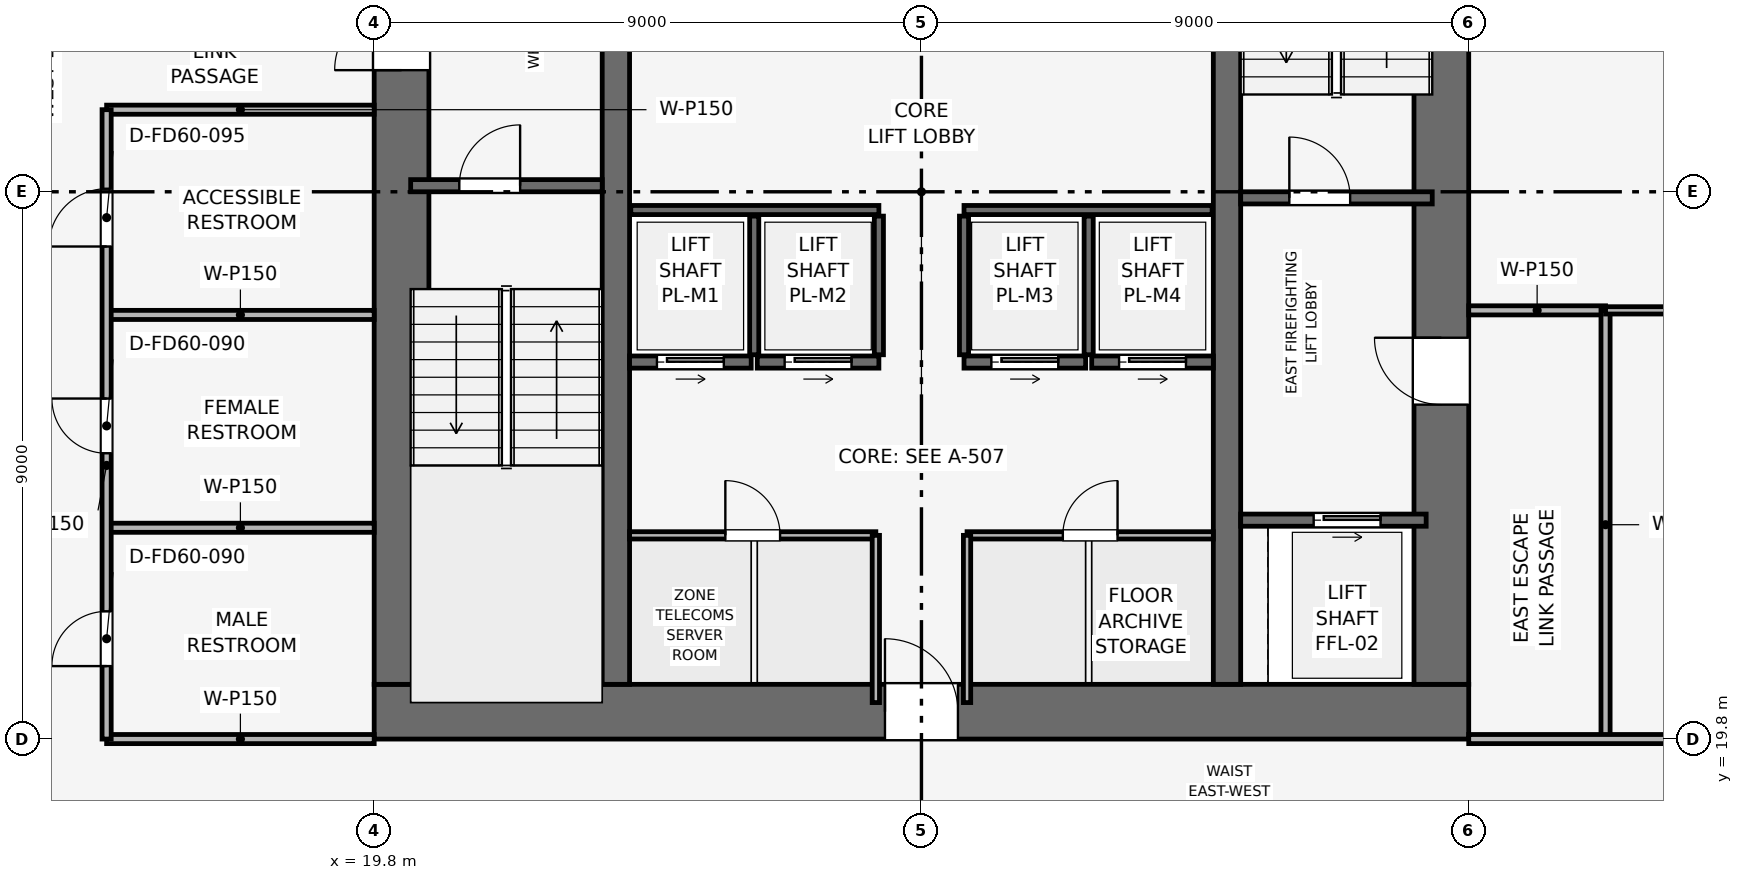
"""IFC4 building model, lengths in metres.
Left out: names, types, materials, properties, quantities, classifications, styles, units other than length and angle.
Written with IfcOpenShell. Run it as: python <this file> out.ifc"""

import sys

from ifc_helpers import new_model, si_unit, direction, frame, frame_2d, origin, place, context, subcontext, project, spatial, rectangle, extrude, element, fill, save


model = new_model("IFC4")
c1 = context("Model", 3, precision=1e-05, world=origin(), true_north=direction((0.0, 1.0)))
c2 = subcontext(c1, "Body", "Model", "MODEL_VIEW")
j1 = project(units=[si_unit("LENGTHUNIT", "METRE"), si_unit("PLANEANGLEUNIT", "RADIAN")], contexts=[c1])
p1 = place(None, origin())
s1 = spatial("IfcSite", under=j1, at=p1, CompositionType="ELEMENT")
p2 = place(p1, origin())
s2 = spatial("IfcBuilding", under=s1, at=p2, CompositionType="ELEMENT")
p3 = place(p2, frame((0.0, 0.0, 149.55)))
s3 = spatial("IfcBuildingStorey", under=s2, at=p3, CompositionType="ELEMENT", Elevation=149.55)
p4 = place(p3, frame((19.8, 20.25, 0.0), z_axis=(0.0, 0.0, 1.0), x_axis=(1.0, 0.0, 0.0)))
e1 = element("IfcWall", 1, at=p4, inside=s3, PredefinedType="SHEAR", context=c2, shape_type="SweptSolid", body=[
    extrude(rectangle(XDim=18.0, YDim=0.9, at=frame_2d((9.0, 0.0))), origin(), (0.0, 0.0, 1.0), 3.75),
])
p5 = place(p4, frame((8.4, 0.0, 0.0)))
e2 = element("IfcOpeningElement", 2, at=p5, cuts=e1, PredefinedType="OPENING", context=c2, shape_type="SweptSolid", body=[
    extrude(rectangle(XDim=1.2, YDim=2.2, at=frame_2d((0.6, 1.1))), frame((0.0, 0.46, 0.0), z_axis=(0.0, -1.0, 0.0), x_axis=(1.0, 0.0, 0.0)), (0.0, 0.0, 1.0), 0.92),
])
p6 = place(p3, frame((20.25, 20.7, 0.0), z_axis=(0.0, 0.0, 1.0), x_axis=(0.0, 1.0, 0.0)))
e3 = element("IfcWall", 3, at=p6, inside=s3, PredefinedType="SHEAR", context=c2, shape_type="SweptSolid", body=[
    extrude(rectangle(XDim=16.2, YDim=0.9, at=frame_2d((8.1, 0.0))), origin(), (0.0, 0.0, 1.0), 3.75),
])
p7 = place(p6, frame((10.1, 0.0, 0.0)))
e4 = element("IfcOpeningElement", 4, at=p7, cuts=e3, PredefinedType="OPENING", context=c2, shape_type="SweptSolid", body=[
    extrude(rectangle(XDim=1.1, YDim=2.15, at=frame_2d((0.55, 1.075))), frame((0.0, 0.46, 0.0), z_axis=(0.0, -1.0, 0.0), x_axis=(1.0, 0.0, 0.0)), (0.0, 0.0, 1.0), 0.92),
])
p8 = place(p3, frame((37.35, 20.7, 0.0), z_axis=(0.0, 0.0, 1.0), x_axis=(0.0, 1.0, 0.0)))
e5 = element("IfcWall", 5, at=p8, inside=s3, PredefinedType="SHEAR", context=c2, shape_type="SweptSolid", body=[
    extrude(rectangle(XDim=16.2, YDim=0.9, at=frame_2d((8.1, 0.0))), origin(), (0.0, 0.0, 1.0), 3.75),
])
p9 = place(p8, frame((4.6, 0.0, 0.0)))
e6 = element("IfcOpeningElement", 6, at=p9, cuts=e5, PredefinedType="OPENING", context=c2, shape_type="SweptSolid", body=[
    extrude(rectangle(XDim=1.1, YDim=2.15, at=frame_2d((0.55, 1.075))), frame((0.0, 0.46, 0.0), z_axis=(0.0, -1.0, 0.0), x_axis=(1.0, 0.0, 0.0)), (0.0, 0.0, 1.0), 0.92),
])
for number, where, z_axis, x_axis in (
    (7, (23.775, 20.7, 0.0), (0.0, 0.0, 1.0), (0.0, 1.0, 0.0)),
    (8, (33.825, 20.7, 0.0), (0.0, 0.0, 1.0), (0.0, 1.0, 0.0)),
):
    element("IfcWall", number, at=place(p3, frame(where, z_axis=z_axis, x_axis=x_axis)), inside=s3, PredefinedType="SHEAR", context=c2, shape_type="SweptSolid", body=[
        extrude(rectangle(XDim=16.2, YDim=0.45, at=frame_2d((8.1, 0.0))), origin(), (0.0, 0.0, 1.0), 3.75),
    ])
p10 = place(p3, frame((20.4, 28.9, 0.0), z_axis=(0.0, 0.0, 1.0), x_axis=(1.0, 0.0, 0.0)))
e9 = element("IfcWall", 9, at=p10, inside=s3, PredefinedType="SHEAR", context=c2, shape_type="SweptSolid", body=[
    extrude(rectangle(XDim=3.15, YDim=0.2, at=frame_2d((1.575, 0.0))), origin(), (0.0, 0.0, 1.0), 3.495),
])
p11 = place(p10, frame((0.8, 0.0, 0.0)))
e10 = element("IfcOpeningElement", 10, at=p11, cuts=e9, PredefinedType="OPENING", context=c2, shape_type="SweptSolid", body=[
    extrude(rectangle(XDim=1.0, YDim=2.1, at=frame_2d((0.5, 1.05))), frame((0.0, 0.11, 0.0), z_axis=(0.0, -1.0, 0.0), x_axis=(1.0, 0.0, 0.0)), (0.0, 0.0, 1.0), 0.22),
])
p12 = place(p3, frame((34.05, 28.7, 0.0), z_axis=(0.0, 0.0, 1.0), x_axis=(1.0, 0.0, 0.0)))
e11 = element("IfcWall", 11, at=p12, inside=s3, PredefinedType="SHEAR", context=c2, shape_type="SweptSolid", body=[
    extrude(rectangle(XDim=3.15, YDim=0.2, at=frame_2d((1.575, 0.0))), origin(), (0.0, 0.0, 1.0), 3.495),
])
p13 = place(p12, frame((0.8, 0.0, 0.0)))
e12 = element("IfcOpeningElement", 12, at=p13, cuts=e11, PredefinedType="OPENING", context=c2, shape_type="SweptSolid", body=[
    extrude(rectangle(XDim=1.0, YDim=2.1, at=frame_2d((0.5, 1.05))), frame((0.0, 0.11, 0.0), z_axis=(0.0, -1.0, 0.0), x_axis=(1.0, 0.0, 0.0)), (0.0, 0.0, 1.0), 0.22),
])
p14 = place(p3, frame((34.05, 23.4, 0.0), z_axis=(0.0, 0.0, 1.0), x_axis=(1.0, 0.0, 0.0)))
e13 = element("IfcWall", 13, at=p14, inside=s3, PredefinedType="SHEAR", context=c2, shape_type="SweptSolid", body=[
    extrude(rectangle(XDim=3.05, YDim=0.2, at=frame_2d((1.525, 0.0))), origin(), (0.0, 0.0, 1.0), 3.495),
])
p15 = place(p14, frame((1.2, 0.0, 0.0)))
e14 = element("IfcOpeningElement", 14, at=p15, cuts=e13, PredefinedType="OPENING", context=c2, shape_type="SweptSolid", body=[
    extrude(rectangle(XDim=1.1, YDim=2.15, at=frame_2d((0.55, 1.075))), frame((0.0, 0.11, 0.0), z_axis=(0.0, -1.0, 0.0), x_axis=(1.0, 0.0, 0.0)), (0.0, 0.0, 1.0), 0.22),
])
p16 = place(p3, frame((24.0, 26.0, 0.0), z_axis=(0.0, 0.0, 1.0), x_axis=(1.0, 0.0, 0.0)))
e15 = element("IfcWall", 15, at=p16, inside=s3, PredefinedType="SHEAR", context=c2, shape_type="SweptSolid", body=[
    extrude(rectangle(XDim=2.0, YDim=0.2, at=frame_2d((1.0, 0.0))), origin(), (0.0, 0.0, 1.0), 3.495),
])
p17 = place(p16, frame((0.45, 0.0, 0.0)))
e16 = element("IfcOpeningElement", 16, at=p17, cuts=e15, PredefinedType="OPENING", context=c2, shape_type="SweptSolid", body=[
    extrude(rectangle(XDim=1.1, YDim=2.15, at=frame_2d((0.55, 1.075))), frame((0.0, 0.11, 0.0), z_axis=(0.0, -1.0, 0.0), x_axis=(1.0, 0.0, 0.0)), (0.0, 0.0, 1.0), 0.22),
])
p18 = place(p3, frame((26.1, 26.0, 0.0), z_axis=(0.0, 0.0, 1.0), x_axis=(1.0, 0.0, 0.0)))
e17 = element("IfcWall", 17, at=p18, inside=s3, PredefinedType="SHEAR", context=c2, shape_type="SweptSolid", body=[
    extrude(rectangle(XDim=2.0, YDim=0.2, at=frame_2d((1.0, 0.0))), origin(), (0.0, 0.0, 1.0), 3.495),
])
p19 = place(p18, frame((0.45, 0.0, 0.0)))
e18 = element("IfcOpeningElement", 18, at=p19, cuts=e17, PredefinedType="OPENING", context=c2, shape_type="SweptSolid", body=[
    extrude(rectangle(XDim=1.1, YDim=2.15, at=frame_2d((0.55, 1.075))), frame((0.0, 0.11, 0.0), z_axis=(0.0, -1.0, 0.0), x_axis=(1.0, 0.0, 0.0)), (0.0, 0.0, 1.0), 0.22),
])
p20 = place(p3, frame((29.5, 26.0, 0.0), z_axis=(0.0, 0.0, 1.0), x_axis=(1.0, 0.0, 0.0)))
e19 = element("IfcWall", 19, at=p20, inside=s3, PredefinedType="SHEAR", context=c2, shape_type="SweptSolid", body=[
    extrude(rectangle(XDim=2.0, YDim=0.2, at=frame_2d((1.0, 0.0))), origin(), (0.0, 0.0, 1.0), 3.495),
])
p21 = place(p20, frame((0.45, 0.0, 0.0)))
e20 = element("IfcOpeningElement", 20, at=p21, cuts=e19, PredefinedType="OPENING", context=c2, shape_type="SweptSolid", body=[
    extrude(rectangle(XDim=1.1, YDim=2.15, at=frame_2d((0.55, 1.075))), frame((0.0, 0.11, 0.0), z_axis=(0.0, -1.0, 0.0), x_axis=(1.0, 0.0, 0.0)), (0.0, 0.0, 1.0), 0.22),
])
p22 = place(p3, frame((31.6, 26.0, 0.0), z_axis=(0.0, 0.0, 1.0), x_axis=(1.0, 0.0, 0.0)))
e21 = element("IfcWall", 21, at=p22, inside=s3, PredefinedType="SHEAR", context=c2, shape_type="SweptSolid", body=[
    extrude(rectangle(XDim=2.0, YDim=0.2, at=frame_2d((1.0, 0.0))), origin(), (0.0, 0.0, 1.0), 3.495),
])
p23 = place(p22, frame((0.45, 0.0, 0.0)))
e22 = element("IfcOpeningElement", 22, at=p23, cuts=e21, PredefinedType="OPENING", context=c2, shape_type="SweptSolid", body=[
    extrude(rectangle(XDim=1.1, YDim=2.15, at=frame_2d((0.55, 1.075))), frame((0.0, 0.11, 0.0), z_axis=(0.0, -1.0, 0.0), x_axis=(1.0, 0.0, 0.0)), (0.0, 0.0, 1.0), 0.22),
])
for number, where, z_axis, x_axis in (
    (23, (24.02, 28.5, 0.0), (0.0, 0.0, 1.0), (1.0, 0.0, 0.0)),
    (24, (29.5, 28.5, 0.0), (0.0, 0.0, 1.0), (1.0, 0.0, 0.0)),
):
    element("IfcWall", number, at=place(p3, frame(where, z_axis=z_axis, x_axis=x_axis)), inside=s3, PredefinedType="SHEAR", context=c2, shape_type="SweptSolid", body=[
        extrude(rectangle(XDim=4.08, YDim=0.15, at=frame_2d((2.04, 0.0))), origin(), (0.0, 0.0, 1.0), 3.495),
    ])
for number, where, z_axis, x_axis in (
    (25, (26.05, 26.12, 0.0), (0.0, 0.0, 1.0), (0.0, 1.0, 0.0)),
    (26, (28.1, 26.12, 0.0), (0.0, 0.0, 1.0), (0.0, 1.0, 0.0)),
    (27, (29.5, 26.12, 0.0), (0.0, 0.0, 1.0), (0.0, 1.0, 0.0)),
    (28, (31.55, 26.12, 0.0), (0.0, 0.0, 1.0), (0.0, 1.0, 0.0)),
):
    element("IfcWall", number, at=place(p3, frame(where, z_axis=z_axis, x_axis=x_axis)), inside=s3, PredefinedType="SHEAR", context=c2, shape_type="SweptSolid", body=[
        extrude(rectangle(XDim=2.28, YDim=0.15, at=frame_2d((1.14, 0.0))), origin(), (0.0, 0.0, 1.0), 3.495),
    ])
p24 = place(p3, frame((24.0, 23.15, 0.0), z_axis=(0.0, 0.0, 1.0), x_axis=(1.0, 0.0, 0.0)))
e29 = element("IfcWall", 29, at=p24, inside=s3, PredefinedType="PARTITIONING", context=c2, shape_type="SweptSolid", body=[
    extrude(rectangle(XDim=4.05, YDim=0.12, at=frame_2d((2.025, 0.0))), origin(), (0.0, 0.0, 1.0), 3.495),
])
p25 = place(p24, frame((1.575, 0.0, 0.0)))
e30 = element("IfcOpeningElement", 30, at=p25, cuts=e29, PredefinedType="OPENING", context=c2, shape_type="SweptSolid", body=[
    extrude(rectangle(XDim=0.9, YDim=2.1, at=frame_2d((0.45, 1.05))), frame((0.0, 0.07, 0.0), z_axis=(0.0, -1.0, 0.0), x_axis=(1.0, 0.0, 0.0)), (0.0, 0.0, 1.0), 0.14),
])
p26 = place(p3, frame((28.05, 20.4, 0.0), z_axis=(0.0, 0.0, 1.0), x_axis=(0.0, 1.0, 0.0)))
e31 = element("IfcWall", 31, at=p26, inside=s3, PredefinedType="PARTITIONING", context=c2, shape_type="SweptSolid", body=[
    extrude(rectangle(XDim=2.75, YDim=0.12, at=frame_2d((1.375, 0.0))), origin(), (0.0, 0.0, 1.0), 3.495),
])
p27 = place(p3, frame((29.55, 23.15, 0.0), z_axis=(0.0, 0.0, 1.0), x_axis=(1.0, 0.0, 0.0)))
e32 = element("IfcWall", 32, at=p27, inside=s3, PredefinedType="PARTITIONING", context=c2, shape_type="SweptSolid", body=[
    extrude(rectangle(XDim=4.05, YDim=0.12, at=frame_2d((2.025, 0.0))), origin(), (0.0, 0.0, 1.0), 3.495),
])
p28 = place(p27, frame((1.575, 0.0, 0.0)))
e33 = element("IfcOpeningElement", 33, at=p28, cuts=e32, PredefinedType="OPENING", context=c2, shape_type="SweptSolid", body=[
    extrude(rectangle(XDim=0.9, YDim=2.1, at=frame_2d((0.45, 1.05))), frame((0.0, 0.07, 0.0), z_axis=(0.0, -1.0, 0.0), x_axis=(1.0, 0.0, 0.0)), (0.0, 0.0, 1.0), 0.14),
])
p29 = place(p3, frame((29.55, 20.4, 0.0), z_axis=(0.0, 0.0, 1.0), x_axis=(0.0, 1.0, 0.0)))
e34 = element("IfcWall", 34, at=p29, inside=s3, PredefinedType="PARTITIONING", context=c2, shape_type="SweptSolid", body=[
    extrude(rectangle(XDim=2.75, YDim=0.12, at=frame_2d((1.375, 0.0))), origin(), (0.0, 0.0, 1.0), 3.495),
])
p30 = place(p3, frame((15.4, 19.8, 0.0), z_axis=(0.0, 0.0, 1.0), x_axis=(1.0, 0.0, 0.0)))
e35 = element("IfcWall", 35, at=p30, inside=s3, PredefinedType="PARTITIONING", context=c2, shape_type="SweptSolid", body=[
    extrude(rectangle(XDim=4.4, YDim=0.15, at=frame_2d((2.2, 0.0))), origin(), (0.0, 0.0, 1.0), 3.03),
])
for number, where, z_axis, x_axis in (
    (36, (15.4, 23.275, 0.0), (0.0, 0.0, 1.0), (1.0, 0.0, 0.0)),
    (37, (15.4, 26.775, 0.0), (0.0, 0.0, 1.0), (1.0, 0.0, 0.0)),
    (38, (15.4, 30.15, 0.0), (0.0, 0.0, 1.0), (1.0, 0.0, 0.0)),
):
    element("IfcWall", number, at=place(p3, frame(where, z_axis=z_axis, x_axis=x_axis)), inside=s3, PredefinedType="PARTITIONING", context=c2, shape_type="SweptSolid", body=[
        extrude(rectangle(XDim=4.4, YDim=0.15, at=frame_2d((2.2, 0.0))), origin(), (0.0, 0.0, 1.0), 3.495),
    ])
p31 = place(p3, frame((15.4, 19.8, 0.0), z_axis=(0.0, 0.0, 1.0), x_axis=(0.0, 1.0, 0.0)))
e39 = element("IfcWall", 39, at=p31, inside=s3, PredefinedType="PARTITIONING", context=c2, shape_type="SweptSolid", body=[
    extrude(rectangle(XDim=10.35, YDim=0.15, at=frame_2d((5.175, 0.0))), origin(), (0.0, 0.0, 1.0), 3.03),
])
p32 = place(p31, frame((1.2, 0.0, 0.0)))
e40 = element("IfcOpeningElement", 40, at=p32, cuts=e39, PredefinedType="OPENING", context=c2, shape_type="SweptSolid", body=[
    extrude(rectangle(XDim=0.9, YDim=2.1, at=frame_2d((0.45, 1.05))), frame((0.0, 0.085, 0.0), z_axis=(0.0, -1.0, 0.0), x_axis=(1.0, 0.0, 0.0)), (0.0, 0.0, 1.0), 0.17),
])
p33 = place(p31, frame((4.7, 0.0, 0.0)))
e41 = element("IfcOpeningElement", 41, at=p33, cuts=e39, PredefinedType="OPENING", context=c2, shape_type="SweptSolid", body=[
    extrude(rectangle(XDim=0.9, YDim=2.1, at=frame_2d((0.45, 1.05))), frame((0.0, 0.085, 0.0), z_axis=(0.0, -1.0, 0.0), x_axis=(1.0, 0.0, 0.0)), (0.0, 0.0, 1.0), 0.17),
])
p34 = place(p31, frame((8.1, 0.0, 0.0)))
e42 = element("IfcOpeningElement", 42, at=p34, cuts=e39, PredefinedType="OPENING", context=c2, shape_type="SweptSolid", body=[
    extrude(rectangle(XDim=0.95, YDim=2.1, at=frame_2d((0.475, 1.05))), frame((0.0, 0.085, 0.0), z_axis=(0.0, -1.0, 0.0), x_axis=(1.0, 0.0, 0.0)), (0.0, 0.0, 1.0), 0.17),
])
p35 = place(p3, frame((37.8, 26.85, 0.0), z_axis=(0.0, 0.0, 1.0), x_axis=(1.0, 0.0, 0.0)))
e43 = element("IfcWall", 43, at=p35, inside=s3, PredefinedType="PARTITIONING", context=c2, shape_type="SweptSolid", body=[
    extrude(rectangle(XDim=2.25, YDim=0.15, at=frame_2d((1.125, 0.0))), origin(), (0.0, 0.0, 1.0), 3.495),
])
p36 = place(p3, frame((40.05, 19.8, 0.0), z_axis=(0.0, 0.0, 1.0), x_axis=(0.0, 1.0, 0.0)))
e44 = element("IfcWall", 44, at=p36, inside=s3, PredefinedType="PARTITIONING", context=c2, shape_type="SweptSolid", body=[
    extrude(rectangle(XDim=7.05, YDim=0.15, at=frame_2d((3.525, 0.0))), origin(), (0.0, 0.0, 1.0), 3.03),
])
p37 = place(p3, frame((40.05, 26.85, 0.0), z_axis=(0.0, 0.0, 1.0), x_axis=(1.0, 0.0, 0.0)))
e45 = element("IfcWall", 45, at=p37, inside=s3, PredefinedType="PARTITIONING", context=c2, shape_type="SweptSolid", body=[
    extrude(rectangle(XDim=12.92, YDim=0.12, at=frame_2d((6.46, 0.0))), origin(), (0.0, 0.0, 1.0), 2.98),
])
p38 = place(p37, frame((6.01, 0.0, 0.0)))
e46 = element("IfcOpeningElement", 46, at=p38, cuts=e45, PredefinedType="OPENING", context=c2, shape_type="SweptSolid", body=[
    extrude(rectangle(XDim=0.9, YDim=2.1, at=frame_2d((0.45, 1.05))), frame((0.0, 0.07, 0.0), z_axis=(0.0, -1.0, 0.0), x_axis=(1.0, 0.0, 0.0)), (0.0, 0.0, 1.0), 0.14),
])
p39 = place(p3, frame((37.8, 19.8, 0.0), z_axis=(0.0, 0.0, 1.0), x_axis=(1.0, 0.0, 0.0)))
e47 = element("IfcWall", 47, at=p39, inside=s3, PredefinedType="PARTITIONING", context=c2, shape_type="SweptSolid", body=[
    extrude(rectangle(XDim=15.17, YDim=0.15, at=frame_2d((7.585, 0.0))), origin(), (0.0, 0.0, 1.0), 2.98),
])
p40 = place(p39, frame((4.4, 0.0, 0.0)))
e48 = element("IfcOpeningElement", 48, at=p40, cuts=e47, PredefinedType="OPENING", context=c2, shape_type="SweptSolid", body=[
    extrude(rectangle(XDim=0.9, YDim=2.1, at=frame_2d((0.45, 1.05))), frame((0.0, 0.085, 0.0), z_axis=(0.0, -1.0, 0.0), x_axis=(1.0, 0.0, 0.0)), (0.0, 0.0, 1.0), 0.17),
])
p41 = place(p11, origin())
e49 = element("IfcDoor", 49, at=p41, inside=s3, OperationType="SINGLE_SWING_RIGHT", PredefinedType="DOOR", context=c2, shape_type="SweptSolid", body=[
    extrude(rectangle(XDim=1.0, YDim=2.1, at=frame_2d((0.5, 1.05))), frame((0.0, 0.025, 0.0), z_axis=(0.0, -1.0, 0.0), x_axis=(1.0, 0.0, 0.0)), (0.0, 0.0, 1.0), 0.05),
])
fill(e10, e49)
p42 = place(p13, origin())
e50 = element("IfcDoor", 50, at=p42, inside=s3, OperationType="SINGLE_SWING_LEFT", PredefinedType="DOOR", context=c2, shape_type="SweptSolid", body=[
    extrude(rectangle(XDim=1.0, YDim=2.1, at=frame_2d((0.5, 1.05))), frame((0.0, 0.025, 0.0), z_axis=(0.0, -1.0, 0.0), x_axis=(1.0, 0.0, 0.0)), (0.0, 0.0, 1.0), 0.05),
])
fill(e12, e50)
p43 = place(p15, origin())
e51 = element("IfcDoor", 51, at=p43, inside=s3, OperationType="SLIDING_TO_RIGHT", PredefinedType="DOOR", context=c2, shape_type="SweptSolid", body=[
    extrude(rectangle(XDim=1.1, YDim=2.15, at=frame_2d((0.55, 1.075))), frame((0.0, 0.025, 0.0), z_axis=(0.0, -1.0, 0.0), x_axis=(1.0, 0.0, 0.0)), (0.0, 0.0, 1.0), 0.05),
])
fill(e14, e51)
p44 = place(p17, origin())
e52 = element("IfcDoor", 52, at=p44, inside=s3, OperationType="SLIDING_TO_RIGHT", PredefinedType="DOOR", context=c2, shape_type="SweptSolid", body=[
    extrude(rectangle(XDim=1.1, YDim=2.15, at=frame_2d((0.55, 1.075))), frame((0.0, 0.025, 0.0), z_axis=(0.0, -1.0, 0.0), x_axis=(1.0, 0.0, 0.0)), (0.0, 0.0, 1.0), 0.05),
])
fill(e16, e52)
p45 = place(p19, origin())
e53 = element("IfcDoor", 53, at=p45, inside=s3, OperationType="SLIDING_TO_RIGHT", PredefinedType="DOOR", context=c2, shape_type="SweptSolid", body=[
    extrude(rectangle(XDim=1.1, YDim=2.15, at=frame_2d((0.55, 1.075))), frame((0.0, 0.025, 0.0), z_axis=(0.0, -1.0, 0.0), x_axis=(1.0, 0.0, 0.0)), (0.0, 0.0, 1.0), 0.05),
])
fill(e18, e53)
p46 = place(p21, origin())
e54 = element("IfcDoor", 54, at=p46, inside=s3, OperationType="SLIDING_TO_RIGHT", PredefinedType="DOOR", context=c2, shape_type="SweptSolid", body=[
    extrude(rectangle(XDim=1.1, YDim=2.15, at=frame_2d((0.55, 1.075))), frame((0.0, 0.025, 0.0), z_axis=(0.0, -1.0, 0.0), x_axis=(1.0, 0.0, 0.0)), (0.0, 0.0, 1.0), 0.05),
])
fill(e20, e54)
p47 = place(p23, origin())
e55 = element("IfcDoor", 55, at=p47, inside=s3, OperationType="SLIDING_TO_RIGHT", PredefinedType="DOOR", context=c2, shape_type="SweptSolid", body=[
    extrude(rectangle(XDim=1.1, YDim=2.15, at=frame_2d((0.55, 1.075))), frame((0.0, 0.025, 0.0), z_axis=(0.0, -1.0, 0.0), x_axis=(1.0, 0.0, 0.0)), (0.0, 0.0, 1.0), 0.05),
])
fill(e22, e55)
p48 = place(p25, origin())
e56 = element("IfcDoor", 56, at=p48, inside=s3, OperationType="SINGLE_SWING_LEFT", PredefinedType="DOOR", context=c2, shape_type="SweptSolid", body=[
    extrude(rectangle(XDim=0.9, YDim=2.1, at=frame_2d((0.45, 1.05))), frame((0.0, 0.025, 0.0), z_axis=(0.0, -1.0, 0.0), x_axis=(1.0, 0.0, 0.0)), (0.0, 0.0, 1.0), 0.05),
])
fill(e30, e56)
p49 = place(p28, origin())
e57 = element("IfcDoor", 57, at=p49, inside=s3, OperationType="SINGLE_SWING_RIGHT", PredefinedType="DOOR", context=c2, shape_type="SweptSolid", body=[
    extrude(rectangle(XDim=0.9, YDim=2.1, at=frame_2d((0.45, 1.05))), frame((0.0, 0.025, 0.0), z_axis=(0.0, -1.0, 0.0), x_axis=(1.0, 0.0, 0.0)), (0.0, 0.0, 1.0), 0.05),
])
fill(e33, e57)
p50 = place(p32, origin())
e58 = element("IfcDoor", 58, at=p50, inside=s3, OperationType="SINGLE_SWING_LEFT", PredefinedType="DOOR", context=c2, shape_type="SweptSolid", body=[
    extrude(rectangle(XDim=0.9, YDim=2.1, at=frame_2d((0.45, 1.05))), frame((0.0, 0.025, 0.0), z_axis=(0.0, -1.0, 0.0), x_axis=(1.0, 0.0, 0.0)), (0.0, 0.0, 1.0), 0.05),
])
fill(e40, e58)
p51 = place(p33, origin())
e59 = element("IfcDoor", 59, at=p51, inside=s3, OperationType="SINGLE_SWING_RIGHT", PredefinedType="DOOR", context=c2, shape_type="SweptSolid", body=[
    extrude(rectangle(XDim=0.9, YDim=2.1, at=frame_2d((0.45, 1.05))), frame((0.0, 0.025, 0.0), z_axis=(0.0, -1.0, 0.0), x_axis=(1.0, 0.0, 0.0)), (0.0, 0.0, 1.0), 0.05),
])
fill(e41, e59)
p52 = place(p34, origin())
e60 = element("IfcDoor", 60, at=p52, inside=s3, OperationType="SINGLE_SWING_LEFT", PredefinedType="DOOR", context=c2, shape_type="SweptSolid", body=[
    extrude(rectangle(XDim=0.95, YDim=2.1, at=frame_2d((0.475, 1.05))), frame((0.0, 0.025, 0.0), z_axis=(0.0, -1.0, 0.0), x_axis=(1.0, 0.0, 0.0)), (0.0, 0.0, 1.0), 0.05),
])
fill(e42, e60)
p53 = place(p7, origin())
e61 = element("IfcDoor", 61, at=p53, inside=s3, OperationType="SINGLE_SWING_LEFT", PredefinedType="DOOR", context=c2, shape_type="SweptSolid", body=[
    extrude(rectangle(XDim=1.1, YDim=2.15, at=frame_2d((0.55, 1.075))), frame((0.0, 0.025, 0.0), z_axis=(0.0, -1.0, 0.0), x_axis=(1.0, 0.0, 0.0)), (0.0, 0.0, 1.0), 0.05),
])
fill(e4, e61)
p54 = place(p9, origin())
e62 = element("IfcDoor", 62, at=p54, inside=s3, OperationType="SINGLE_SWING_RIGHT", PredefinedType="DOOR", context=c2, shape_type="SweptSolid", body=[
    extrude(rectangle(XDim=1.1, YDim=2.15, at=frame_2d((0.55, 1.075))), frame((0.0, 0.025, 0.0), z_axis=(0.0, -1.0, 0.0), x_axis=(1.0, 0.0, 0.0)), (0.0, 0.0, 1.0), 0.05),
])
fill(e6, e62)
p55 = place(p5, origin())
e63 = element("IfcDoor", 63, at=p55, inside=s3, OperationType="SINGLE_SWING_LEFT", PredefinedType="DOOR", context=c2, shape_type="SweptSolid", body=[
    extrude(rectangle(XDim=1.2, YDim=2.2, at=frame_2d((0.6, 1.1))), frame((0.0, 0.025, 0.0), z_axis=(0.0, -1.0, 0.0), x_axis=(1.0, 0.0, 0.0)), (0.0, 0.0, 1.0), 0.05),
])
fill(e2, e63)
save(model, sys.argv[1])
